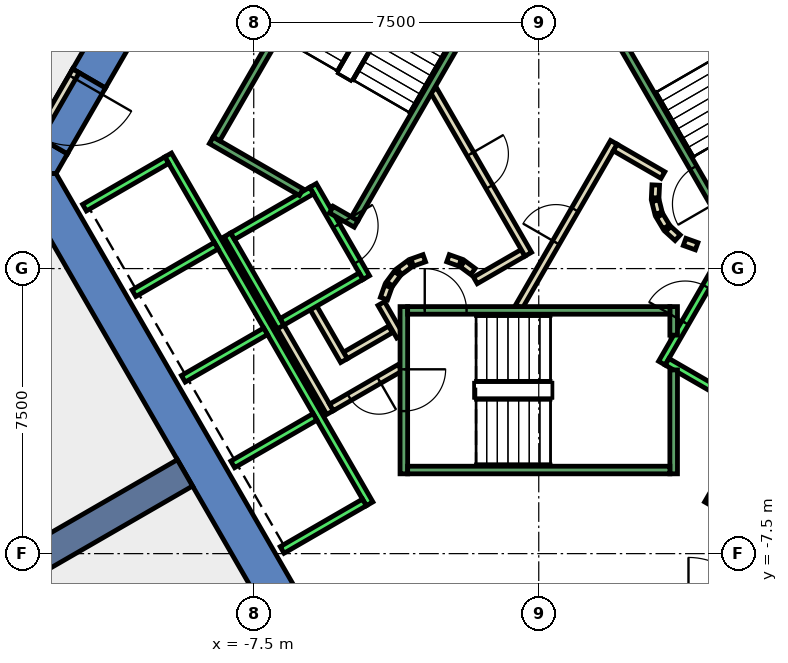
"""IFC4 building model, lengths in metres.
Left out: names, types, materials, properties, quantities, classifications, styles, units other than length and angle.
Written with IfcOpenShell. Run it as: python <this file> out.ifc"""

import sys

from ifc_helpers import new_model, si_unit, direction, frame, frame_2d, origin, place, context, subcontext, project, spatial, polyline, rectangle, outline, extrude, element, fill, save


model = new_model("IFC4")
c1 = context("Model", 3, precision=1e-05, world=origin(), true_north=direction((0.0, 1.0)))
c2 = subcontext(c1, "Body", "Model", "MODEL_VIEW")
j1 = project(units=[si_unit("LENGTHUNIT", "METRE"), si_unit("PLANEANGLEUNIT", "RADIAN")], contexts=[c1])
p1 = place(None, origin())
s1 = spatial("IfcSite", under=j1, at=p1, CompositionType="ELEMENT")
p2 = place(p1, origin())
s2 = spatial("IfcBuilding", under=s1, at=p2, CompositionType="ELEMENT")
p3 = place(p2, frame((0.0, 0.0, 20.0)))
s3 = spatial("IfcBuildingStorey", under=s2, at=p3, CompositionType="ELEMENT", Elevation=20.0)
p4 = place(p3, frame((0.0, 0.0, -0.45)))
e1 = element("IfcWall", 1, at=p4, inside=s3, PredefinedType="SHEAR", context=c2, shape_type="SweptSolid", body=[
    extrude(outline(polyline([(-12.267, 5.252), (-11.402, 4.752), (-6.351, 13.5), (-6.928, 14.5), (-12.267, 5.252)])), origin(), (0.0, 0.0, 1.0), 5.0),
])
p5 = place(p3, frame((0.0, 0.0, -0.45)))
e2 = element("IfcWall", 2, at=p5, inside=s3, PredefinedType="SHEAR", context=c2, shape_type="SweptSolid", body=[
    extrude(outline(polyline([(-12.402, 3.02), (-13.267, 3.52), (-13.856, 2.5), (-12.702, 2.5), (-12.402, 3.02)])), origin(), (0.0, 0.0, 1.0), 5.0),
])
p6 = place(p3, frame((0.0, 0.0, 3.6)))
e3 = element("IfcWall", 3, at=p6, inside=s3, PredefinedType="SHEAR", context=c2, shape_type="SweptSolid", body=[
    extrude(outline(polyline([(-13.267, 3.52), (-12.402, 3.02), (-11.402, 4.752), (-12.267, 5.252), (-13.267, 3.52)])), origin(), (0.0, 0.0, 1.0), 0.95),
])
p7 = place(p3, frame((0.0, 0.0, -0.45)))
e4 = element("IfcWall", 4, at=p7, inside=s3, PredefinedType="SHEAR", context=c2, shape_type="SweptSolid", body=[
    extrude(outline(polyline([(-13.856, 2.5), (-6.928, -9.5), (-6.351, -8.5), (-12.702, 2.5), (-13.856, 2.5)])), origin(), (0.0, 0.0, 1.0), 5.0),
])
p8 = place(p3, frame((-9.31, -5.375, -0.45), z_axis=(0.0, 0.0, 1.0), x_axis=(-0.866017533419, -0.500013631625, 0.0)))
e5 = element("IfcWall", 5, at=p8, inside=s3, PredefinedType="SHEAR", context=c2, shape_type="SweptSolid", body=[
    extrude(rectangle(XDim=9.0, YDim=0.8, at=frame_2d((4.5, 0.0))), origin(), (0.0, 0.0, 1.0), 5.0),
])
p9 = place(p3, frame((-3.9, -1.599, 0.0), z_axis=(0.0, 0.0, 1.0), x_axis=(-0.865969445389, -0.500096910261, 0.0)))
e6 = element("IfcWall", 6, at=p9, inside=s3, PredefinedType="PARTITIONING", context=c2, shape_type="SweptSolid", body=[
    extrude(rectangle(XDim=1.373, YDim=0.2, at=frame_2d((0.687, 0.0))), origin(), (0.0, 0.0, 1.0), 4.55),
])
p10 = place(p3, frame((-5.126, -2.422, 0.0), z_axis=(0.0, 0.0, 1.0), x_axis=(-0.500062241894, 0.865989465428, 0.0)))
e7 = element("IfcWall", 7, at=p10, inside=s3, PredefinedType="PARTITIONING", context=c2, shape_type="SweptSolid", body=[
    extrude(rectangle(XDim=1.7, YDim=0.2, at=frame_2d((0.85, 0.0))), origin(), (0.0, 0.0, 1.0), 4.55),
])
p11 = place(p3, frame((-5.492, -3.788, 0.0), z_axis=(0.0, 0.0, 1.0), x_axis=(-0.500008949224, 0.866020236886, 0.0)))
e8 = element("IfcWall", 8, at=p11, inside=s3, PredefinedType="PARTITIONING", context=c2, shape_type="SweptSolid", body=[
    extrude(rectangle(XDim=2.68, YDim=0.2, at=frame_2d((1.34, 0.0))), origin(), (0.0, 0.0, 1.0), 4.55),
])
p12 = place(p3, frame((-4.145, -0.92, 0.0), z_axis=(0.0, 0.0, 1.0), x_axis=(0.499743786207, -0.866173278362, 0.0)))
e9 = element("IfcWall", 9, at=p12, inside=s3, PredefinedType="PARTITIONING", context=c2, shape_type="SweptSolid", body=[
    extrude(rectangle(XDim=0.991, YDim=0.2, at=frame_2d((0.495, 0.0))), origin(), (0.0, 0.0, 1.0), 4.55),
])
p13 = place(p3, frame((-3.65, -2.61, 0.0), z_axis=(0.0, 0.0, 1.0), x_axis=(-0.866072462134, -0.499918483688, 0.0)))
e10 = element("IfcWall", 10, at=p13, inside=s3, PredefinedType="PARTITIONING", context=c2, shape_type="SweptSolid", body=[
    extrude(rectangle(XDim=2.084, YDim=0.2, at=frame_2d((1.042, 0.0))), origin(), (0.0, 0.0, 1.0), 4.55),
])
p14 = place(p13, frame((0.642, 0.0, 0.0)))
e11 = element("IfcOpeningElement", 11, at=p14, cuts=e10, PredefinedType="OPENING", context=c2, shape_type="SweptSolid", body=[
    extrude(rectangle(XDim=0.9, YDim=2.1, at=frame_2d((0.45, 1.05))), frame((0.0, 0.11, 0.0), z_axis=(0.0, -1.0, 0.0), x_axis=(1.0, 0.0, 0.0)), (0.0, 0.0, 1.0), 0.22),
])
p15 = place(p3, frame((3.079, 2.199, 0.0), z_axis=(0.0, 0.0, 1.0), x_axis=(-0.047771483479, -0.998858290933, 0.0)))
e12 = element("IfcWall", 12, at=p15, inside=s3, PredefinedType="PARTITIONING", context=c2, shape_type="SweptSolid", body=[
    extrude(rectangle(XDim=0.337, YDim=0.2, at=frame_2d((0.169, 0.0))), origin(), (0.0, 0.0, 1.0), 4.55),
])
p16 = place(p3, frame((3.07, 1.786, 0.0), z_axis=(0.0, 0.0, 1.0), x_axis=(0.242705583207, -0.970099994784, 0.0)))
e13 = element("IfcWall", 13, at=p16, inside=s3, PredefinedType="PARTITIONING", context=c2, shape_type="SweptSolid", body=[
    extrude(rectangle(XDim=0.338, YDim=0.2, at=frame_2d((0.169, 0.0))), origin(), (0.0, 0.0, 1.0), 4.55),
])
for number, where, z_axis, x_axis in (
    (14, (3.182, 1.388, 0.0), (0.0, 0.0, 1.0), (0.512, -0.859, 0.0)),
    (15, (3.404, 1.039, 0.0), (0.0, 0.0, 1.0), (0.74, -0.672, 0.0)),
):
    element("IfcWall", number, at=place(p3, frame(where, z_axis=z_axis, x_axis=x_axis)), inside=s3, PredefinedType="PARTITIONING", context=c2, shape_type="SweptSolid", body=[
        extrude(rectangle(XDim=0.338, YDim=0.2, at=frame_2d((0.169, 0.0))), origin(), (0.0, 0.0, 1.0), 4.55),
    ])
p17 = place(p3, frame((3.838, 0.702, 0.0), z_axis=(0.0, 0.0, 1.0), x_axis=(0.941035081519, -0.338308993895, 0.0)))
e16 = element("IfcWall", 16, at=p17, inside=s3, PredefinedType="PARTITIONING", context=c2, shape_type="SweptSolid", body=[
    extrude(rectangle(XDim=0.337, YDim=0.2, at=frame_2d((0.168, 0.0))), origin(), (0.0, 0.0, 1.0), 4.55),
])
p18 = place(p3, frame((-0.52, -1.0, 0.0), z_axis=(0.0, 0.0, 1.0), x_axis=(0.50011622646, 0.865958290007, 0.0)))
e17 = element("IfcWall", 17, at=p18, inside=s3, PredefinedType="PARTITIONING", context=c2, shape_type="SweptSolid", body=[
    extrude(rectangle(XDim=4.991, YDim=0.2, at=frame_2d((2.496, 0.0))), origin(), (0.0, 0.0, 1.0), 4.55),
])
p19 = place(p18, frame((1.945, 0.0, 0.0)))
e18 = element("IfcOpeningElement", 18, at=p19, cuts=e17, PredefinedType="OPENING", context=c2, shape_type="SweptSolid", body=[
    extrude(rectangle(XDim=1.0, YDim=2.1, at=frame_2d((0.5, 1.05))), frame((0.0, 0.11, 0.0), z_axis=(0.0, -1.0, 0.0), x_axis=(1.0, 0.0, 0.0)), (0.0, 0.0, 1.0), 0.22),
])
p20 = place(p3, frame((2.012, 3.186, 0.0), z_axis=(0.0, 0.0, 1.0), x_axis=(0.865891012941, -0.500232699559, 0.0)))
e19 = element("IfcWall", 19, at=p20, inside=s3, PredefinedType="PARTITIONING", context=c2, shape_type="SweptSolid", body=[
    extrude(rectangle(XDim=1.449, YDim=0.2, at=frame_2d((0.725, 0.0))), origin(), (0.0, 0.0, 1.0), 4.55),
])
p21 = place(p3, frame((-0.412, 0.414, 0.0), z_axis=(0.0, 0.0, 1.0), x_axis=(-0.866017369001, -0.500013916395, 0.0)))
e20 = element("IfcWall", 20, at=p21, inside=s3, PredefinedType="PARTITIONING", context=c2, shape_type="SweptSolid", body=[
    extrude(rectangle(XDim=1.45, YDim=0.2, at=frame_2d((0.725, 0.0))), origin(), (0.0, 0.0, 1.0), 4.55),
])
p22 = place(p3, frame((-1.731, -0.077, 0.0), z_axis=(0.0, 0.0, 1.0), x_axis=(-0.804311165252, 0.594208338422, 0.0)))
e21 = element("IfcWall", 21, at=p22, inside=s3, PredefinedType="PARTITIONING", context=c2, shape_type="SweptSolid", body=[
    extrude(rectangle(XDim=0.338, YDim=0.2, at=frame_2d((0.169, 0.0))), origin(), (0.0, 0.0, 1.0), 4.55),
])
p23 = place(p3, frame((-2.07, 0.16, 0.0), z_axis=(0.0, 0.0, 1.0), x_axis=(-0.942199461132, 0.335052496547, 0.0)))
e22 = element("IfcWall", 22, at=p23, inside=s3, PredefinedType="PARTITIONING", context=c2, shape_type="SweptSolid", body=[
    extrude(rectangle(XDim=0.337, YDim=0.2, at=frame_2d((0.169, 0.0))), origin(), (0.0, 0.0, 1.0), 4.55),
])
p24 = place(p3, frame((-3.012, 0.273, 0.0), z_axis=(0.0, 0.0, 1.0), x_axis=(-0.942280615813, -0.334824194261, 0.0)))
e23 = element("IfcWall", 23, at=p24, inside=s3, PredefinedType="PARTITIONING", context=c2, shape_type="SweptSolid", body=[
    extrude(rectangle(XDim=0.338, YDim=0.2, at=frame_2d((0.169, 0.0))), origin(), (0.0, 0.0, 1.0), 4.55),
])
p25 = place(p3, frame((-3.397, 0.124, 0.0), z_axis=(0.0, 0.0, 1.0), x_axis=(-0.804311165252, -0.594208338422, 0.0)))
e24 = element("IfcWall", 24, at=p25, inside=s3, PredefinedType="PARTITIONING", context=c2, shape_type="SweptSolid", body=[
    extrude(rectangle(XDim=0.338, YDim=0.2, at=frame_2d((0.169, 0.0))), origin(), (0.0, 0.0, 1.0), 4.55),
])
p26 = place(p3, frame((-3.723, -0.131, 0.0), z_axis=(0.0, 0.0, 1.0), x_axis=(-0.594675113454, -0.803966112121, 0.0)))
e25 = element("IfcWall", 25, at=p26, inside=s3, PredefinedType="PARTITIONING", context=c2, shape_type="SweptSolid", body=[
    extrude(rectangle(XDim=0.338, YDim=0.2, at=frame_2d((0.169, 0.0))), origin(), (0.0, 0.0, 1.0), 4.55),
])
p27 = place(p3, frame((-3.96, -0.47, 0.0), z_axis=(0.0, 0.0, 1.0), x_axis=(-0.334824194261, -0.942280615813, 0.0)))
e26 = element("IfcWall", 26, at=p27, inside=s3, PredefinedType="PARTITIONING", context=c2, shape_type="SweptSolid", body=[
    extrude(rectangle(XDim=0.338, YDim=0.2, at=frame_2d((0.169, 0.0))), origin(), (0.0, 0.0, 1.0), 4.55),
])
p28 = place(p3, frame((-2.771, 4.7, 0.0), z_axis=(0.0, 0.0, 1.0), x_axis=(0.499969479948, -0.866043023828, 0.0)))
e27 = element("IfcWall", 27, at=p28, inside=s3, PredefinedType="PARTITIONING", context=c2, shape_type="SweptSolid", body=[
    extrude(rectangle(XDim=4.99, YDim=0.2, at=frame_2d((2.495, 0.0))), origin(), (0.0, 0.0, 1.0), 4.55),
])
p29 = place(p28, frame((1.945, 0.0, 0.0)))
e28 = element("IfcOpeningElement", 28, at=p29, cuts=e27, PredefinedType="OPENING", context=c2, shape_type="SweptSolid", body=[
    extrude(rectangle(XDim=1.0, YDim=2.1, at=frame_2d((0.5, 1.05))), frame((0.0, 0.11, 0.0), z_axis=(0.0, -1.0, 0.0), x_axis=(1.0, 0.0, 0.0)), (0.0, 0.0, 1.0), 0.22),
])
p30 = place(p3, frame((-21.976, 2.435, 0.0), z_axis=(0.0, 0.0, 1.0), x_axis=(0.499977403953, 0.866038449225, 0.0)))
e29 = element("IfcWall", 29, at=p30, inside=s3, PredefinedType="PARTITIONING", context=c2, shape_type="SweptSolid", body=[
    extrude(rectangle(XDim=21.939, YDim=0.15, at=frame_2d((10.969, 0.0))), origin(), (0.0, 0.0, 1.0), 4.55),
])
p31 = place(p3, frame((-12.18, 5.202, 0.0), z_axis=(0.0, 0.0, 1.0), x_axis=(-0.50002537861, -0.866010750942, 0.0)))
e30 = element("IfcWall", 30, at=p31, inside=s3, PredefinedType="PARTITIONING", context=c2, shape_type="SweptSolid", body=[
    extrude(rectangle(XDim=2.0, YDim=0.2, at=frame_2d((1.0, 0.0))), origin(), (0.0, 0.0, 1.0), 2.4),
])
p32 = place(p31, frame((0.19, 0.0, 0.0)))
e31 = element("IfcOpeningElement", 31, at=p32, cuts=e30, PredefinedType="OPENING", context=c2, shape_type="SweptSolid", body=[
    extrude(rectangle(XDim=1.8, YDim=2.1, at=frame_2d((0.9, 1.05))), frame((0.0, 0.11, 0.0), z_axis=(0.0, -1.0, 0.0), x_axis=(1.0, 0.0, 0.0)), (0.0, 0.0, 1.0), 0.22),
])
p33 = place(p3, frame((-5.94, 2.188, 0.0), z_axis=(0.0, 0.0, 1.0), x_axis=(0.49994636267, -0.866056369097, 0.0)))
e32 = element("IfcWall", 32, at=p33, inside=s3, PredefinedType="STANDARD", context=c2, shape_type="SweptSolid", body=[
    extrude(rectangle(XDim=2.8, YDim=0.2, at=frame_2d((1.4, 0.0))), origin(), (0.0, 0.0, 1.0), 4.55),
])
p34 = place(p33, frame((1.225, 0.0, 0.0)))
e33 = element("IfcOpeningElement", 33, at=p34, cuts=e32, PredefinedType="OPENING", context=c2, shape_type="SweptSolid", body=[
    extrude(rectangle(XDim=1.1, YDim=2.1, at=frame_2d((0.55, 1.05))), frame((0.0, 0.11, 0.0), z_axis=(0.0, -1.0, 0.0), x_axis=(1.0, 0.0, 0.0)), (0.0, 0.0, 1.0), 0.22),
])
p35 = place(p3, frame((-8.192, 0.888, 0.0), z_axis=(0.0, 0.0, 1.0), x_axis=(0.49994636267, -0.866056369097, 0.0)))
e34 = element("IfcWall", 34, at=p35, inside=s3, PredefinedType="STANDARD", context=c2, shape_type="SweptSolid", body=[
    extrude(rectangle(XDim=2.8, YDim=0.2, at=frame_2d((1.4, 0.0))), origin(), (0.0, 0.0, 1.0), 4.55),
])
for number, where, z_axis, x_axis in (
    (35, (-5.977, 2.052, 0.0), (0.0, 0.0, 1.0), (-0.866, -0.5, 0.0)),
    (36, (-4.677, -0.2, 0.0), (0.0, 0.0, 1.0), (-0.866, -0.5, 0.0)),
):
    element("IfcWall", number, at=place(p3, frame(where, z_axis=z_axis, x_axis=x_axis)), inside=s3, PredefinedType="STANDARD", context=c2, shape_type="SweptSolid", body=[
        extrude(rectangle(XDim=2.399, YDim=0.2, at=frame_2d((1.2, 0.0))), origin(), (0.0, 0.0, 1.0), 4.55),
    ])
p36 = place(p3, frame((-9.751, 2.99, 0.0), z_axis=(0.0, 0.0, 1.0), x_axis=(0.50000090737, -0.866024879913, 0.0)))
e37 = element("IfcWall", 37, at=p36, inside=s3, PredefinedType="STANDARD", context=c2, shape_type="SweptSolid", body=[
    extrude(rectangle(XDim=10.6, YDim=0.2, at=frame_2d((5.3, 0.0))), origin(), (0.0, 0.0, 1.0), 4.55),
])
p37 = place(p3, frame((-9.788, 2.853, 0.0), z_axis=(0.0, 0.0, 1.0), x_axis=(-0.865998541277, -0.500046524342, 0.0)))
e38 = element("IfcWall", 38, at=p37, inside=s3, PredefinedType="STANDARD", context=c2, shape_type="SweptSolid", body=[
    extrude(rectangle(XDim=2.5, YDim=0.2, at=frame_2d((1.25, 0.0))), origin(), (0.0, 0.0, 1.0), 4.55),
])
for number, where, z_axis, x_axis in (
    (39, (-8.488, 0.602, 0.0), (0.0, 0.0, 1.0), (-0.866, -0.5, 0.0)),
    (40, (-7.188, -1.65, 0.0), (0.0, 0.0, 1.0), (-0.866, -0.5, 0.0)),
    (41, (-5.888, -3.902, 0.0), (0.0, 0.0, 1.0), (-0.866, -0.5, 0.0)),
    (42, (-4.588, -6.153, 0.0), (0.0, 0.0, 1.0), (-0.866, -0.5, 0.0)),
):
    element("IfcWall", number, at=place(p3, frame(where, z_axis=z_axis, x_axis=x_axis)), inside=s3, PredefinedType="STANDARD", context=c2, shape_type="SweptSolid", body=[
        extrude(rectangle(XDim=2.5, YDim=0.2, at=frame_2d((1.25, 0.0))), origin(), (0.0, 0.0, 1.0), 4.55),
    ])
p38 = place(p3, frame((3.24, -2.488, 0.0), z_axis=(0.0, 0.0, 1.0), x_axis=(0.49994636267, 0.866056369097, 0.0)))
e43 = element("IfcWall", 43, at=p38, inside=s3, PredefinedType="STANDARD", context=c2, shape_type="SweptSolid", body=[
    extrude(rectangle(XDim=2.8, YDim=0.2, at=frame_2d((1.4, 0.0))), origin(), (0.0, 0.0, 1.0), 4.55),
])
p39 = place(p38, frame((1.225, 0.0, 0.0)))
e44 = element("IfcOpeningElement", 44, at=p39, cuts=e43, PredefinedType="OPENING", context=c2, shape_type="SweptSolid", body=[
    extrude(rectangle(XDim=1.1, YDim=2.1, at=frame_2d((0.55, 1.05))), frame((0.0, 0.11, 0.0), z_axis=(0.0, -1.0, 0.0), x_axis=(1.0, 0.0, 0.0)), (0.0, 0.0, 1.0), 0.22),
])
p40 = place(p3, frame((3.377, -2.452, 0.0), z_axis=(0.0, 0.0, 1.0), x_axis=(0.865955154139, -0.50012165622, 0.0)))
e45 = element("IfcWall", 45, at=p40, inside=s3, PredefinedType="STANDARD", context=c2, shape_type="SweptSolid", body=[
    extrude(rectangle(XDim=2.4, YDim=0.2, at=frame_2d((1.2, 0.0))), origin(), (0.0, 0.0, 1.0), 4.55),
])
p41 = place(p3, frame((4.451, -6.19, 0.0), z_axis=(0.0, 0.0, 1.0), x_axis=(0.50000090737, 0.866024879913, 0.0)))
e46 = element("IfcWall", 46, at=p41, inside=s3, PredefinedType="STANDARD", context=c2, shape_type="SweptSolid", body=[
    extrude(rectangle(XDim=10.6, YDim=0.2, at=frame_2d((5.3, 0.0))), origin(), (0.0, 0.0, 1.0), 4.55),
])
p42 = place(p3, frame((-3.55, -1.0, 0.0), z_axis=(0.0, 0.0, 1.0), x_axis=(0.0, -1.0, 0.0)))
e47 = element("IfcWall", 47, at=p42, inside=s3, PredefinedType="STANDARD", context=c2, shape_type="SweptSolid", body=[
    extrude(rectangle(XDim=4.4, YDim=0.2, at=frame_2d((2.2, 0.0))), origin(), (0.0, 0.0, 1.0), 4.55),
])
p43 = place(p42, frame((1.65, 0.0, 0.0)))
e48 = element("IfcOpeningElement", 48, at=p43, cuts=e47, PredefinedType="OPENING", context=c2, shape_type="SweptSolid", body=[
    extrude(rectangle(XDim=1.1, YDim=2.2, at=frame_2d((0.55, 1.1))), frame((0.0, 0.11, 0.0), z_axis=(0.0, -1.0, 0.0), x_axis=(1.0, 0.0, 0.0)), (0.0, 0.0, 1.0), 0.22),
])
p44 = place(p3, frame((3.55, -2.667, 0.0), z_axis=(0.0, 0.0, 1.0), x_axis=(0.0, -1.0, 0.0)))
e49 = element("IfcWall", 49, at=p44, inside=s3, PredefinedType="STANDARD", context=c2, shape_type="SweptSolid", body=[
    extrude(rectangle(XDim=2.733, YDim=0.2, at=frame_2d((1.366, 0.0))), origin(), (0.0, 0.0, 1.0), 4.55),
])
p45 = place(p3, frame((3.55, -1.0, 0.0), z_axis=(0.0, 0.0, 1.0), x_axis=(0.0, -1.0, 0.0)))
e50 = element("IfcWall", 50, at=p45, inside=s3, PredefinedType="STANDARD", context=c2, shape_type="SweptSolid", body=[
    extrude(rectangle(XDim=0.751, YDim=0.2, at=frame_2d((0.375, 0.0))), origin(), (0.0, 0.0, 1.0), 4.55),
])
p46 = place(p3, frame((-3.45, -1.1, 0.0), z_axis=(0.0, 0.0, 1.0), x_axis=(1.0, 0.0, 0.0)))
e51 = element("IfcWall", 51, at=p46, inside=s3, PredefinedType="STANDARD", context=c2, shape_type="SweptSolid", body=[
    extrude(rectangle(XDim=6.9, YDim=0.2, at=frame_2d((3.45, 0.0))), origin(), (0.0, 0.0, 1.0), 4.55),
])
p47 = place(p46, frame((0.45, 0.0, 0.0)))
e52 = element("IfcOpeningElement", 52, at=p47, cuts=e51, PredefinedType="OPENING", context=c2, shape_type="SweptSolid", body=[
    extrude(rectangle(XDim=1.1, YDim=2.2, at=frame_2d((0.55, 1.1))), frame((0.0, 0.11, 0.0), z_axis=(0.0, -1.0, 0.0), x_axis=(1.0, 0.0, 0.0)), (0.0, 0.0, 1.0), 0.22),
])
p48 = place(p3, frame((-3.45, -5.3, 0.0), z_axis=(0.0, 0.0, 1.0), x_axis=(1.0, 0.0, 0.0)))
e53 = element("IfcWall", 53, at=p48, inside=s3, PredefinedType="STANDARD", context=c2, shape_type="SweptSolid", body=[
    extrude(rectangle(XDim=6.9, YDim=0.2, at=frame_2d((3.45, 0.0))), origin(), (0.0, 0.0, 1.0), 4.55),
])
p49 = place(p3, frame((4.843, 1.312, 0.0), z_axis=(0.0, 0.0, 1.0), x_axis=(-0.499963383562, 0.866046543262, 0.0)))
e54 = element("IfcWall", 54, at=p49, inside=s3, PredefinedType="STANDARD", context=c2, shape_type="SweptSolid", body=[
    extrude(rectangle(XDim=6.9, YDim=0.2, at=frame_2d((3.45, 0.0))), origin(), (0.0, 0.0, 1.0), 4.55),
])
p50 = place(p49, frame((0.45, 0.0, 0.0)))
e55 = element("IfcOpeningElement", 55, at=p50, cuts=e54, PredefinedType="OPENING", context=c2, shape_type="SweptSolid", body=[
    extrude(rectangle(XDim=1.1, YDim=2.2, at=frame_2d((0.55, 1.1))), frame((0.0, 0.11, 0.0), z_axis=(0.0, -1.0, 0.0), x_axis=(1.0, 0.0, 0.0)), (0.0, 0.0, 1.0), 0.22),
])
p51 = place(p3, frame((-6.25, 2.01, 0.0), z_axis=(0.0, 0.0, 1.0), x_axis=(-0.86611865017, 0.499838457731, 0.0)))
e56 = element("IfcWall", 56, at=p51, inside=s3, PredefinedType="STANDARD", context=c2, shape_type="SweptSolid", body=[
    extrude(rectangle(XDim=2.733, YDim=0.2, at=frame_2d((1.366, 0.0))), origin(), (0.0, 0.0, 1.0), 4.55),
])
p52 = place(p3, frame((-4.806, 1.176, 0.0), z_axis=(0.0, 0.0, 1.0), x_axis=(-0.866558586415, 0.499075361355, 0.0)))
e57 = element("IfcWall", 57, at=p52, inside=s3, PredefinedType="STANDARD", context=c2, shape_type="SweptSolid", body=[
    extrude(rectangle(XDim=0.751, YDim=0.2, at=frame_2d((0.376, 0.0))), origin(), (0.0, 0.0, 1.0), 4.55),
])
p53 = place(p3, frame((-1.393, 7.288, 0.0), z_axis=(0.0, 0.0, 1.0), x_axis=(-0.499963383562, -0.866046543262, 0.0)))
e58 = element("IfcWall", 58, at=p53, inside=s3, PredefinedType="STANDARD", context=c2, shape_type="SweptSolid", body=[
    extrude(rectangle(XDim=6.9, YDim=0.2, at=frame_2d((3.45, 0.0))), origin(), (0.0, 0.0, 1.0), 4.55),
])
p54 = place(p53, frame((0.45, 0.0, 0.0)))
e59 = element("IfcOpeningElement", 59, at=p54, cuts=e58, PredefinedType="OPENING", context=c2, shape_type="SweptSolid", body=[
    extrude(rectangle(XDim=1.1, YDim=2.2, at=frame_2d((0.55, 1.1))), frame((0.0, 0.11, 0.0), z_axis=(0.0, -1.0, 0.0), x_axis=(1.0, 0.0, 0.0)), (0.0, 0.0, 1.0), 0.22),
])
p55 = place(p3, frame((-5.03, 9.388, 0.0), z_axis=(0.0, 0.0, 1.0), x_axis=(-0.499978703459, -0.866037698999, 0.0)))
e60 = element("IfcWall", 60, at=p55, inside=s3, PredefinedType="STANDARD", context=c2, shape_type="SweptSolid", body=[
    extrude(rectangle(XDim=6.9, YDim=0.2, at=frame_2d((3.45, 0.0))), origin(), (0.0, 0.0, 1.0), 4.55),
])
p56 = place(p19, origin())
e61 = element("IfcDoor", 61, at=p56, inside=s3, OperationType="SINGLE_SWING_LEFT", PredefinedType="DOOR", context=c2, shape_type="SweptSolid", body=[
    extrude(rectangle(XDim=1.0, YDim=2.1, at=frame_2d((0.5, 1.05))), frame((0.0, 0.025, 0.0), z_axis=(0.0, -1.0, 0.0), x_axis=(1.0, 0.0, 0.0)), (0.0, 0.0, 1.0), 0.05),
])
fill(e18, e61)
p57 = place(p29, origin())
e62 = element("IfcDoor", 62, at=p57, inside=s3, OperationType="SINGLE_SWING_RIGHT", PredefinedType="DOOR", context=c2, shape_type="SweptSolid", body=[
    extrude(rectangle(XDim=1.0, YDim=2.1, at=frame_2d((0.5, 1.05))), frame((0.0, 0.025, 0.0), z_axis=(0.0, -1.0, 0.0), x_axis=(1.0, 0.0, 0.0)), (0.0, 0.0, 1.0), 0.05),
])
fill(e28, e62)
p58 = place(p14, origin())
e63 = element("IfcDoor", 63, at=p58, inside=s3, OperationType="SINGLE_SWING_LEFT", PredefinedType="DOOR", context=c2, shape_type="SweptSolid", body=[
    extrude(rectangle(XDim=0.9, YDim=2.1, at=frame_2d((0.45, 1.05))), frame((0.0, 0.025, 0.0), z_axis=(0.0, -1.0, 0.0), x_axis=(1.0, 0.0, 0.0)), (0.0, 0.0, 1.0), 0.05),
])
fill(e11, e63)
p59 = place(p32, origin())
e64 = element("IfcDoor", 64, at=p59, inside=s3, OperationType="DOUBLE_DOOR_SINGLE_SWING", PredefinedType="DOOR", context=c2, shape_type="SweptSolid", body=[
    extrude(rectangle(XDim=1.8, YDim=2.1, at=frame_2d((0.9, 1.05))), frame((0.0, 0.025, 0.0), z_axis=(0.0, -1.0, 0.0), x_axis=(1.0, 0.0, 0.0)), (0.0, 0.0, 1.0), 0.05),
])
fill(e31, e64)
p60 = place(p39, origin())
e65 = element("IfcDoor", 65, at=p60, inside=s3, OperationType="SLIDING_TO_LEFT", PredefinedType="DOOR", context=c2, shape_type="SweptSolid", body=[
    extrude(rectangle(XDim=1.1, YDim=2.1, at=frame_2d((0.55, 1.05))), frame((0.0, 0.025, 0.0), z_axis=(0.0, -1.0, 0.0), x_axis=(1.0, 0.0, 0.0)), (0.0, 0.0, 1.0), 0.05),
])
fill(e44, e65)
p61 = place(p34, origin())
e66 = element("IfcDoor", 66, at=p61, inside=s3, OperationType="SLIDING_TO_LEFT", PredefinedType="DOOR", context=c2, shape_type="SweptSolid", body=[
    extrude(rectangle(XDim=1.1, YDim=2.1, at=frame_2d((0.55, 1.05))), frame((0.0, 0.025, 0.0), z_axis=(0.0, -1.0, 0.0), x_axis=(1.0, 0.0, 0.0)), (0.0, 0.0, 1.0), 0.05),
])
fill(e33, e66)
p62 = place(p47, origin())
e67 = element("IfcDoor", 67, at=p62, inside=s3, OperationType="SINGLE_SWING_LEFT", PredefinedType="DOOR", context=c2, shape_type="SweptSolid", body=[
    extrude(rectangle(XDim=1.1, YDim=2.2, at=frame_2d((0.55, 1.1))), frame((0.0, 0.025, 0.0), z_axis=(0.0, -1.0, 0.0), x_axis=(1.0, 0.0, 0.0)), (0.0, 0.0, 1.0), 0.05),
])
fill(e52, e67)
p63 = place(p43, origin())
e68 = element("IfcDoor", 68, at=p63, inside=s3, OperationType="SINGLE_SWING_LEFT", PredefinedType="DOOR", context=c2, shape_type="SweptSolid", body=[
    extrude(rectangle(XDim=1.1, YDim=2.2, at=frame_2d((0.55, 1.1))), frame((0.0, 0.025, 0.0), z_axis=(0.0, -1.0, 0.0), x_axis=(1.0, 0.0, 0.0)), (0.0, 0.0, 1.0), 0.05),
])
fill(e48, e68)
p64 = place(p50, origin())
e69 = element("IfcDoor", 69, at=p64, inside=s3, OperationType="SINGLE_SWING_LEFT", PredefinedType="DOOR", context=c2, shape_type="SweptSolid", body=[
    extrude(rectangle(XDim=1.1, YDim=2.2, at=frame_2d((0.55, 1.1))), frame((0.0, 0.025, 0.0), z_axis=(0.0, -1.0, 0.0), x_axis=(1.0, 0.0, 0.0)), (0.0, 0.0, 1.0), 0.05),
])
fill(e55, e69)
save(model, sys.argv[1])
